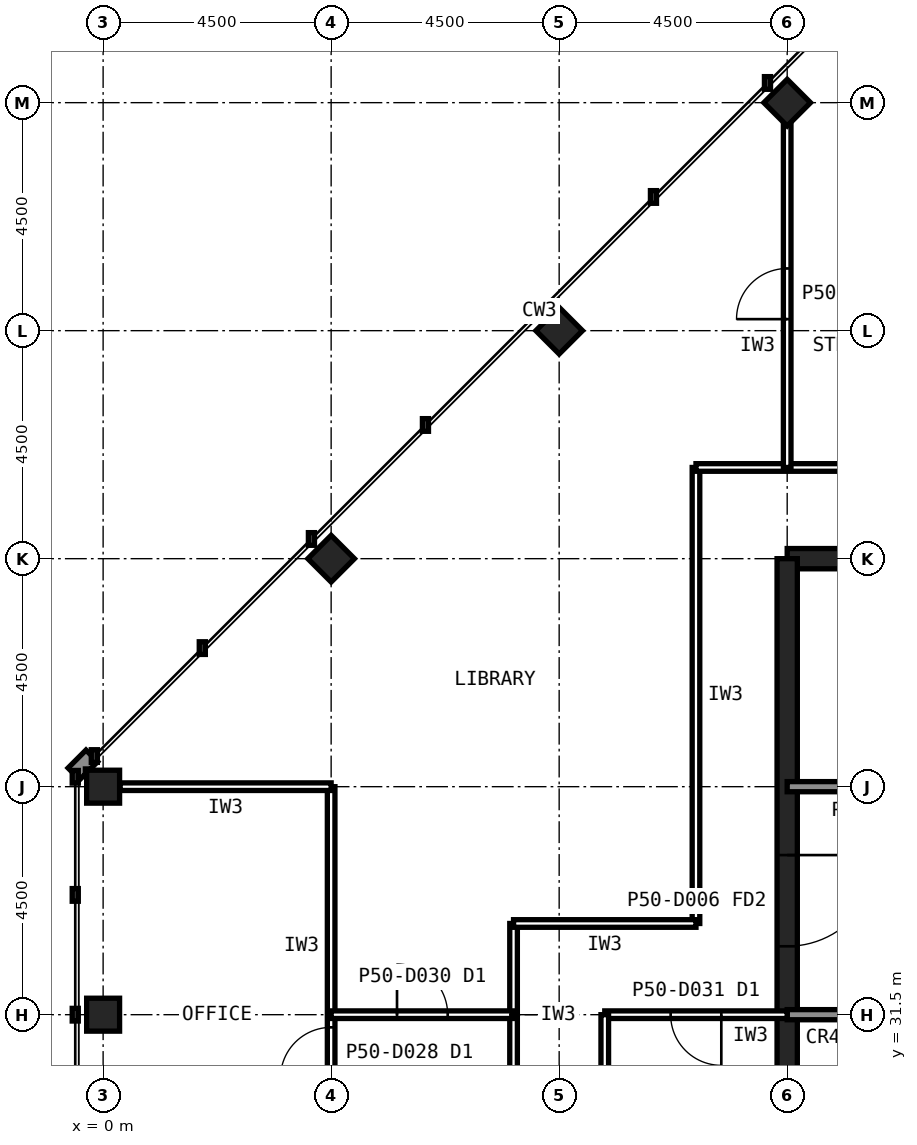
"""IFC4 building model, lengths in metres.
Left out: names, types, materials, properties, quantities, classifications, styles, units other than length and angle.
Written with IfcOpenShell. Run it as: python <this file> out.ifc"""

import sys

from ifc_helpers import new_model, si_unit, direction, frame, frame_2d, origin, origin_2d, place, context, subcontext, project, spatial, rectangle, hollow_rectangle, extrude, element, fill, save


model = new_model("IFC4")
c1 = context("Model", 3, precision=1e-05, world=origin(), true_north=direction((0.0, 1.0)))
c2 = subcontext(c1, "Body", "Model", "MODEL_VIEW")
j1 = project(units=[si_unit("LENGTHUNIT", "METRE"), si_unit("PLANEANGLEUNIT", "RADIAN")], contexts=[c1])
p1 = place(None, origin())
s1 = spatial("IfcSite", under=j1, at=p1, CompositionType="ELEMENT")
p2 = place(p1, origin())
s2 = spatial("IfcBuilding", under=s1, at=p2, CompositionType="ELEMENT")
p3 = place(p2, frame((0.0, 0.0, 214.6)))
s3 = spatial("IfcBuildingStorey", under=s2, at=p3, CompositionType="ELEMENT", Elevation=214.6)
for number, where, z_axis, x_axis in (
    (1, (0.0, 36.0, 0.0), (0.0, 0.0, 1.0), (1.0, 0.0, 0.0)),
    (2, (0.0, 31.5, 0.0), (0.0, 0.0, 1.0), (1.0, 0.0, 0.0)),
    (3, (4.5, 40.5, 0.0), (0.0, 0.0, 1.0), (0.707, 0.707, 0.0)),
    (4, (9.0, 45.0, 0.0), (0.0, 0.0, 1.0), (0.707, 0.707, 0.0)),
    (5, (13.5, 49.5, 0.0), (0.0, 0.0, 1.0), (0.707, 0.707, 0.0)),
):
    element("IfcColumn", number, at=place(p3, frame(where, z_axis=z_axis, x_axis=x_axis)), inside=s3, PredefinedType="COLUMN", context=c2, shape_type="SweptSolid", body=[
        extrude(hollow_rectangle(XDim=0.65, YDim=0.65, WallThickness=0.032, at=origin_2d()), origin(), (0.0, 0.0, 1.0), 4.0),
    ])
p4 = place(p3, frame((40.5, 40.5, 0.0), z_axis=(0.0, 0.0, 1.0), x_axis=(-1.0, 0.0, 0.0)))
e6 = element("IfcWall", 6, at=p4, inside=s3, PredefinedType="SHEAR", context=c2, shape_type="SweptSolid", body=[
    extrude(rectangle(XDim=27.0, YDim=0.4, at=frame_2d((13.5, 0.0))), origin(), (0.0, 0.0, 1.0), 4.0),
])
p5 = place(p3, frame((13.5, 40.5, 0.0), z_axis=(0.0, 0.0, 1.0), x_axis=(0.0, -1.0, 0.0)))
e7 = element("IfcWall", 7, at=p5, inside=s3, PredefinedType="SHEAR", context=c2, shape_type="SweptSolid", body=[
    extrude(rectangle(XDim=27.0, YDim=0.4, at=frame_2d((13.5, 0.0))), origin(), (0.0, 0.0, 1.0), 4.0),
])
p6 = place(p5, frame((19.65, 0.0, 0.0)))
e8 = element("IfcOpeningElement", 8, at=p6, cuts=e7, PredefinedType="OPENING", context=c2, shape_type="SweptSolid", body=[
    extrude(rectangle(XDim=1.2, YDim=2.1, at=frame_2d((0.6, 1.05))), frame((0.0, 0.21, 0.0), z_axis=(0.0, -1.0, 0.0), x_axis=(1.0, 0.0, 0.0)), (0.0, 0.0, 1.0), 0.42),
])
p7 = place(p5, frame((5.85, 0.0, 0.0)))
e9 = element("IfcOpeningElement", 9, at=p7, cuts=e7, PredefinedType="OPENING", context=c2, shape_type="SweptSolid", body=[
    extrude(rectangle(XDim=1.8, YDim=2.1, at=frame_2d((0.9, 1.05))), frame((0.0, 0.21, 0.0), z_axis=(0.0, -1.0, 0.0), x_axis=(1.0, 0.0, 0.0)), (0.0, 0.0, 1.0), 0.42),
])
p8 = place(p3, frame((13.5, 36.0, 0.0), z_axis=(0.0, 0.0, 1.0), x_axis=(1.0, 0.0, 0.0)))
e10 = element("IfcWall", 10, at=p8, inside=s3, PredefinedType="SOLIDWALL", context=c2, shape_type="SweptSolid", body=[
    extrude(rectangle(XDim=27.0, YDim=0.2, at=frame_2d((13.5, 0.0))), origin(), (0.0, 0.0, 1.0), 3.84),
])
p9 = place(p8, frame((1.8, 0.0, 0.0)))
e11 = element("IfcOpeningElement", 11, at=p9, cuts=e10, PredefinedType="OPENING", context=c2, shape_type="SweptSolid", body=[
    extrude(rectangle(XDim=0.9, YDim=2.1, at=frame_2d((0.45, 1.05))), frame((0.0, 0.11, 0.0), z_axis=(0.0, -1.0, 0.0), x_axis=(1.0, 0.0, 0.0)), (0.0, 0.0, 1.0), 0.22),
])
p10 = place(p8, frame((5.55, 0.0, 0.0)))
e12 = element("IfcOpeningElement", 12, at=p10, cuts=e10, PredefinedType="OPENING", context=c2, shape_type="SweptSolid", body=[
    extrude(rectangle(XDim=0.9, YDim=2.1, at=frame_2d((0.45, 1.05))), frame((0.0, 0.11, 0.0), z_axis=(0.0, -1.0, 0.0), x_axis=(1.0, 0.0, 0.0)), (0.0, 0.0, 1.0), 0.22),
])
p11 = place(p8, frame((11.55, 0.0, 0.0)))
e13 = element("IfcOpeningElement", 13, at=p11, cuts=e10, PredefinedType="OPENING", context=c2, shape_type="SweptSolid", body=[
    extrude(rectangle(XDim=0.9, YDim=2.1, at=frame_2d((0.45, 1.05))), frame((0.0, 0.11, 0.0), z_axis=(0.0, -1.0, 0.0), x_axis=(1.0, 0.0, 0.0)), (0.0, 0.0, 1.0), 0.22),
])
p12 = place(p8, frame((14.55, 0.0, 0.0)))
e14 = element("IfcOpeningElement", 14, at=p12, cuts=e10, PredefinedType="OPENING", context=c2, shape_type="SweptSolid", body=[
    extrude(rectangle(XDim=0.9, YDim=2.1, at=frame_2d((0.45, 1.05))), frame((0.0, 0.11, 0.0), z_axis=(0.0, -1.0, 0.0), x_axis=(1.0, 0.0, 0.0)), (0.0, 0.0, 1.0), 0.22),
])
p13 = place(p8, frame((20.55, 0.0, 0.0)))
e15 = element("IfcOpeningElement", 15, at=p13, cuts=e10, PredefinedType="OPENING", context=c2, shape_type="SweptSolid", body=[
    extrude(rectangle(XDim=0.9, YDim=2.1, at=frame_2d((0.45, 1.05))), frame((0.0, 0.11, 0.0), z_axis=(0.0, -1.0, 0.0), x_axis=(1.0, 0.0, 0.0)), (0.0, 0.0, 1.0), 0.22),
])
p14 = place(p8, frame((24.1, 0.0, 0.0)))
e16 = element("IfcOpeningElement", 16, at=p14, cuts=e10, PredefinedType="OPENING", context=c2, shape_type="SweptSolid", body=[
    extrude(rectangle(XDim=1.3, YDim=2.2, at=frame_2d((0.65, 1.1))), frame((0.0, 0.11, 0.0), z_axis=(0.0, -1.0, 0.0), x_axis=(1.0, 0.0, 0.0)), (0.0, 0.0, 1.0), 0.22),
])
p15 = place(p3, frame((13.5, 31.5, 0.0), z_axis=(0.0, 0.0, 1.0), x_axis=(1.0, 0.0, 0.0)))
e17 = element("IfcWall", 17, at=p15, inside=s3, PredefinedType="SOLIDWALL", context=c2, shape_type="SweptSolid", body=[
    extrude(rectangle(XDim=27.0, YDim=0.2, at=frame_2d((13.5, 0.0))), origin(), (0.0, 0.0, 1.0), 3.84),
])
p16 = place(p15, frame((24.15, 0.0, 0.0)))
e18 = element("IfcOpeningElement", 18, at=p16, cuts=e17, PredefinedType="OPENING", context=c2, shape_type="SweptSolid", body=[
    extrude(rectangle(XDim=1.2, YDim=2.1, at=frame_2d((0.6, 1.05))), frame((0.0, 0.11, 0.0), z_axis=(0.0, -1.0, 0.0), x_axis=(1.0, 0.0, 0.0)), (0.0, 0.0, 1.0), 0.22),
])
p17 = place(p15, frame((15.3, 0.0, 0.0)))
e19 = element("IfcOpeningElement", 19, at=p17, cuts=e17, PredefinedType="OPENING", context=c2, shape_type="SweptSolid", body=[
    extrude(rectangle(XDim=0.9, YDim=2.1, at=frame_2d((0.45, 1.05))), frame((0.0, 0.11, 0.0), z_axis=(0.0, -1.0, 0.0), x_axis=(1.0, 0.0, 0.0)), (0.0, 0.0, 1.0), 0.22),
])
p18 = place(p15, frame((19.8, 0.0, 0.0)))
e20 = element("IfcOpeningElement", 20, at=p18, cuts=e17, PredefinedType="OPENING", context=c2, shape_type="SweptSolid", body=[
    extrude(rectangle(XDim=0.9, YDim=2.1, at=frame_2d((0.45, 1.05))), frame((0.0, 0.11, 0.0), z_axis=(0.0, -1.0, 0.0), x_axis=(1.0, 0.0, 0.0)), (0.0, 0.0, 1.0), 0.22),
])
p19 = place(p3, frame((8.1, 33.3, 0.0), z_axis=(0.0, 0.0, 1.0), x_axis=(0.0, -1.0, 0.0)))
e21 = element("IfcWall", 21, at=p19, inside=s3, PredefinedType="PARTITIONING", context=c2, shape_type="SweptSolid", body=[
    extrude(rectangle(XDim=12.6, YDim=0.15, at=frame_2d((6.3, 0.0))), origin(), (0.0, 0.0, 1.0), 3.84),
])
p20 = place(p19, frame((5.8, 0.0, 0.0)))
e22 = element("IfcOpeningElement", 22, at=p20, cuts=e21, PredefinedType="OPENING", context=c2, shape_type="SweptSolid", body=[
    extrude(rectangle(XDim=1.0, YDim=2.1, at=frame_2d((0.5, 1.05))), frame((0.0, 0.085, 0.0), z_axis=(0.0, -1.0, 0.0), x_axis=(1.0, 0.0, 0.0)), (0.0, 0.0, 1.0), 0.17),
])
for number, where, z_axis, x_axis in (
    (23, (11.7, 42.3, 0.0), (0.0, 0.0, 1.0), (0.0, -1.0, 0.0)),
    (24, (20.7, 42.3, 0.0), (0.0, 0.0, 1.0), (-1.0, 0.0, 0.0)),
):
    element("IfcWall", number, at=place(p3, frame(where, z_axis=z_axis, x_axis=x_axis)), inside=s3, PredefinedType="PARTITIONING", context=c2, shape_type="SweptSolid", body=[
        extrude(rectangle(XDim=9.0, YDim=0.15, at=frame_2d((4.5, 0.0))), origin(), (0.0, 0.0, 1.0), 3.84),
    ])
p21 = place(p3, frame((11.7, 33.3, 0.0), z_axis=(0.0, 0.0, 1.0), x_axis=(-1.0, 0.0, 0.0)))
e25 = element("IfcWall", 25, at=p21, inside=s3, PredefinedType="PARTITIONING", context=c2, shape_type="SweptSolid", body=[
    extrude(rectangle(XDim=3.6, YDim=0.15, at=frame_2d((1.8, 0.0))), origin(), (0.0, 0.0, 1.0), 3.84),
])
p22 = place(p3, frame((13.5, 31.5, 0.0), z_axis=(0.0, 0.0, 1.0), x_axis=(-1.0, 0.0, 0.0)))
e26 = element("IfcWall", 26, at=p22, inside=s3, PredefinedType="PARTITIONING", context=c2, shape_type="SweptSolid", body=[
    extrude(rectangle(XDim=3.6, YDim=0.15, at=frame_2d((1.8, 0.0))), origin(), (0.0, 0.0, 1.0), 2.989),
])
p23 = place(p22, frame((1.3, 0.0, 0.0)))
e27 = element("IfcOpeningElement", 27, at=p23, cuts=e26, PredefinedType="OPENING", context=c2, shape_type="SweptSolid", body=[
    extrude(rectangle(XDim=1.0, YDim=2.1, at=frame_2d((0.5, 1.05))), frame((0.0, 0.085, 0.0), z_axis=(0.0, -1.0, 0.0), x_axis=(1.0, 0.0, 0.0)), (0.0, 0.0, 1.0), 0.17),
])
p24 = place(p3, frame((9.9, 31.5, 0.0), z_axis=(0.0, 0.0, 1.0), x_axis=(0.0, -1.0, 0.0)))
e28 = element("IfcWall", 28, at=p24, inside=s3, PredefinedType="PARTITIONING", context=c2, shape_type="SweptSolid", body=[
    extrude(rectangle(XDim=9.0, YDim=0.15, at=frame_2d((4.5, 0.0))), origin(), (0.0, 0.0, 1.0), 3.84),
])
p25 = place(p3, frame((4.5, 27.0, 0.0), z_axis=(0.0, 0.0, 1.0), x_axis=(0.0, 1.0, 0.0)))
e29 = element("IfcWall", 29, at=p25, inside=s3, PredefinedType="PARTITIONING", context=c2, shape_type="SweptSolid", body=[
    extrude(rectangle(XDim=9.0, YDim=0.15, at=frame_2d((4.5, 0.0))), origin(), (0.0, 0.0, 1.0), 3.84),
])
p26 = place(p25, frame((3.25, 0.0, 0.0)))
e30 = element("IfcOpeningElement", 30, at=p26, cuts=e29, PredefinedType="OPENING", context=c2, shape_type="SweptSolid", body=[
    extrude(rectangle(XDim=1.0, YDim=2.1, at=frame_2d((0.5, 1.05))), frame((0.0, 0.085, 0.0), z_axis=(0.0, -1.0, 0.0), x_axis=(1.0, 0.0, 0.0)), (0.0, 0.0, 1.0), 0.17),
])
p27 = place(p3, frame((4.5, 36.0, 0.0), z_axis=(0.0, 0.0, 1.0), x_axis=(-1.0, 0.0, 0.0)))
e31 = element("IfcWall", 31, at=p27, inside=s3, PredefinedType="PARTITIONING", context=c2, shape_type="SweptSolid", body=[
    extrude(rectangle(XDim=4.165, YDim=0.15, at=frame_2d((2.083, 0.0))), origin(), (0.0, 0.0, 1.0), 2.989),
])
p28 = place(p3, frame((13.5, 42.3, 0.0), z_axis=(0.0, 0.0, 1.0), x_axis=(0.0, 1.0, 0.0)))
e32 = element("IfcWall", 32, at=p28, inside=s3, PredefinedType="PARTITIONING", context=c2, shape_type="SweptSolid", body=[
    extrude(rectangle(XDim=6.855, YDim=0.15, at=frame_2d((3.427, 0.0))), origin(), (0.0, 0.0, 1.0), 2.989),
])
p29 = place(p28, frame((2.927, 0.0, 0.0)))
e33 = element("IfcOpeningElement", 33, at=p29, cuts=e32, PredefinedType="OPENING", context=c2, shape_type="SweptSolid", body=[
    extrude(rectangle(XDim=1.0, YDim=2.1, at=frame_2d((0.5, 1.05))), frame((0.0, 0.085, 0.0), z_axis=(0.0, -1.0, 0.0), x_axis=(1.0, 0.0, 0.0)), (0.0, 0.0, 1.0), 0.17),
])
p30 = place(p3, frame((4.5, 31.5, 0.0), z_axis=(0.0, 0.0, 1.0), x_axis=(1.0, 0.0, 0.0)))
e34 = element("IfcWall", 34, at=p30, inside=s3, PredefinedType="PARTITIONING", context=c2, shape_type="SweptSolid", body=[
    extrude(rectangle(XDim=3.6, YDim=0.15, at=frame_2d((1.8, 0.0))), origin(), (0.0, 0.0, 1.0), 2.989),
])
p31 = place(p30, frame((1.3, 0.0, 0.0)))
e35 = element("IfcOpeningElement", 35, at=p31, cuts=e34, PredefinedType="OPENING", context=c2, shape_type="SweptSolid", body=[
    extrude(rectangle(XDim=1.0, YDim=2.1, at=frame_2d((0.5, 1.05))), frame((0.0, 0.085, 0.0), z_axis=(0.0, -1.0, 0.0), x_axis=(1.0, 0.0, 0.0)), (0.0, 0.0, 1.0), 0.17),
])
p32 = place(p7, origin())
e36 = element("IfcDoor", 36, at=p32, inside=s3, OperationType="SINGLE_SWING_LEFT", PredefinedType="DOOR", context=c2, shape_type="SweptSolid", body=[
    extrude(rectangle(XDim=1.8, YDim=2.1, at=frame_2d((0.9, 1.05))), frame((0.0, 0.025, 0.0), z_axis=(0.0, -1.0, 0.0), x_axis=(1.0, 0.0, 0.0)), (0.0, 0.0, 1.0), 0.05),
])
fill(e9, e36)
p33 = place(p23, origin())
e37 = element("IfcDoor", 37, at=p33, inside=s3, OperationType="SINGLE_SWING_LEFT", PredefinedType="DOOR", context=c2, shape_type="SweptSolid", body=[
    extrude(rectangle(XDim=1.0, YDim=2.1, at=frame_2d((0.5, 1.05))), frame((0.0, 0.025, 0.0), z_axis=(0.0, -1.0, 0.0), x_axis=(1.0, 0.0, 0.0)), (0.0, 0.0, 1.0), 0.05),
])
fill(e27, e37)
p34 = place(p26, origin())
e38 = element("IfcDoor", 38, at=p34, inside=s3, OperationType="SINGLE_SWING_LEFT", PredefinedType="DOOR", context=c2, shape_type="SweptSolid", body=[
    extrude(rectangle(XDim=1.0, YDim=2.1, at=frame_2d((0.5, 1.05))), frame((0.0, 0.025, 0.0), z_axis=(0.0, -1.0, 0.0), x_axis=(1.0, 0.0, 0.0)), (0.0, 0.0, 1.0), 0.05),
])
fill(e30, e38)
p35 = place(p29, origin())
e39 = element("IfcDoor", 39, at=p35, inside=s3, OperationType="SINGLE_SWING_LEFT", PredefinedType="DOOR", context=c2, shape_type="SweptSolid", body=[
    extrude(rectangle(XDim=1.0, YDim=2.1, at=frame_2d((0.5, 1.05))), frame((0.0, 0.025, 0.0), z_axis=(0.0, -1.0, 0.0), x_axis=(1.0, 0.0, 0.0)), (0.0, 0.0, 1.0), 0.05),
])
fill(e33, e39)
p36 = place(p31, origin())
e40 = element("IfcDoor", 40, at=p36, inside=s3, OperationType="SINGLE_SWING_LEFT", PredefinedType="DOOR", context=c2, shape_type="SweptSolid", body=[
    extrude(rectangle(XDim=1.0, YDim=2.1, at=frame_2d((0.5, 1.05))), frame((0.0, 0.025, 0.0), z_axis=(0.0, -1.0, 0.0), x_axis=(1.0, 0.0, 0.0)), (0.0, 0.0, 1.0), 0.05),
])
fill(e35, e40)
save(model, sys.argv[1])
